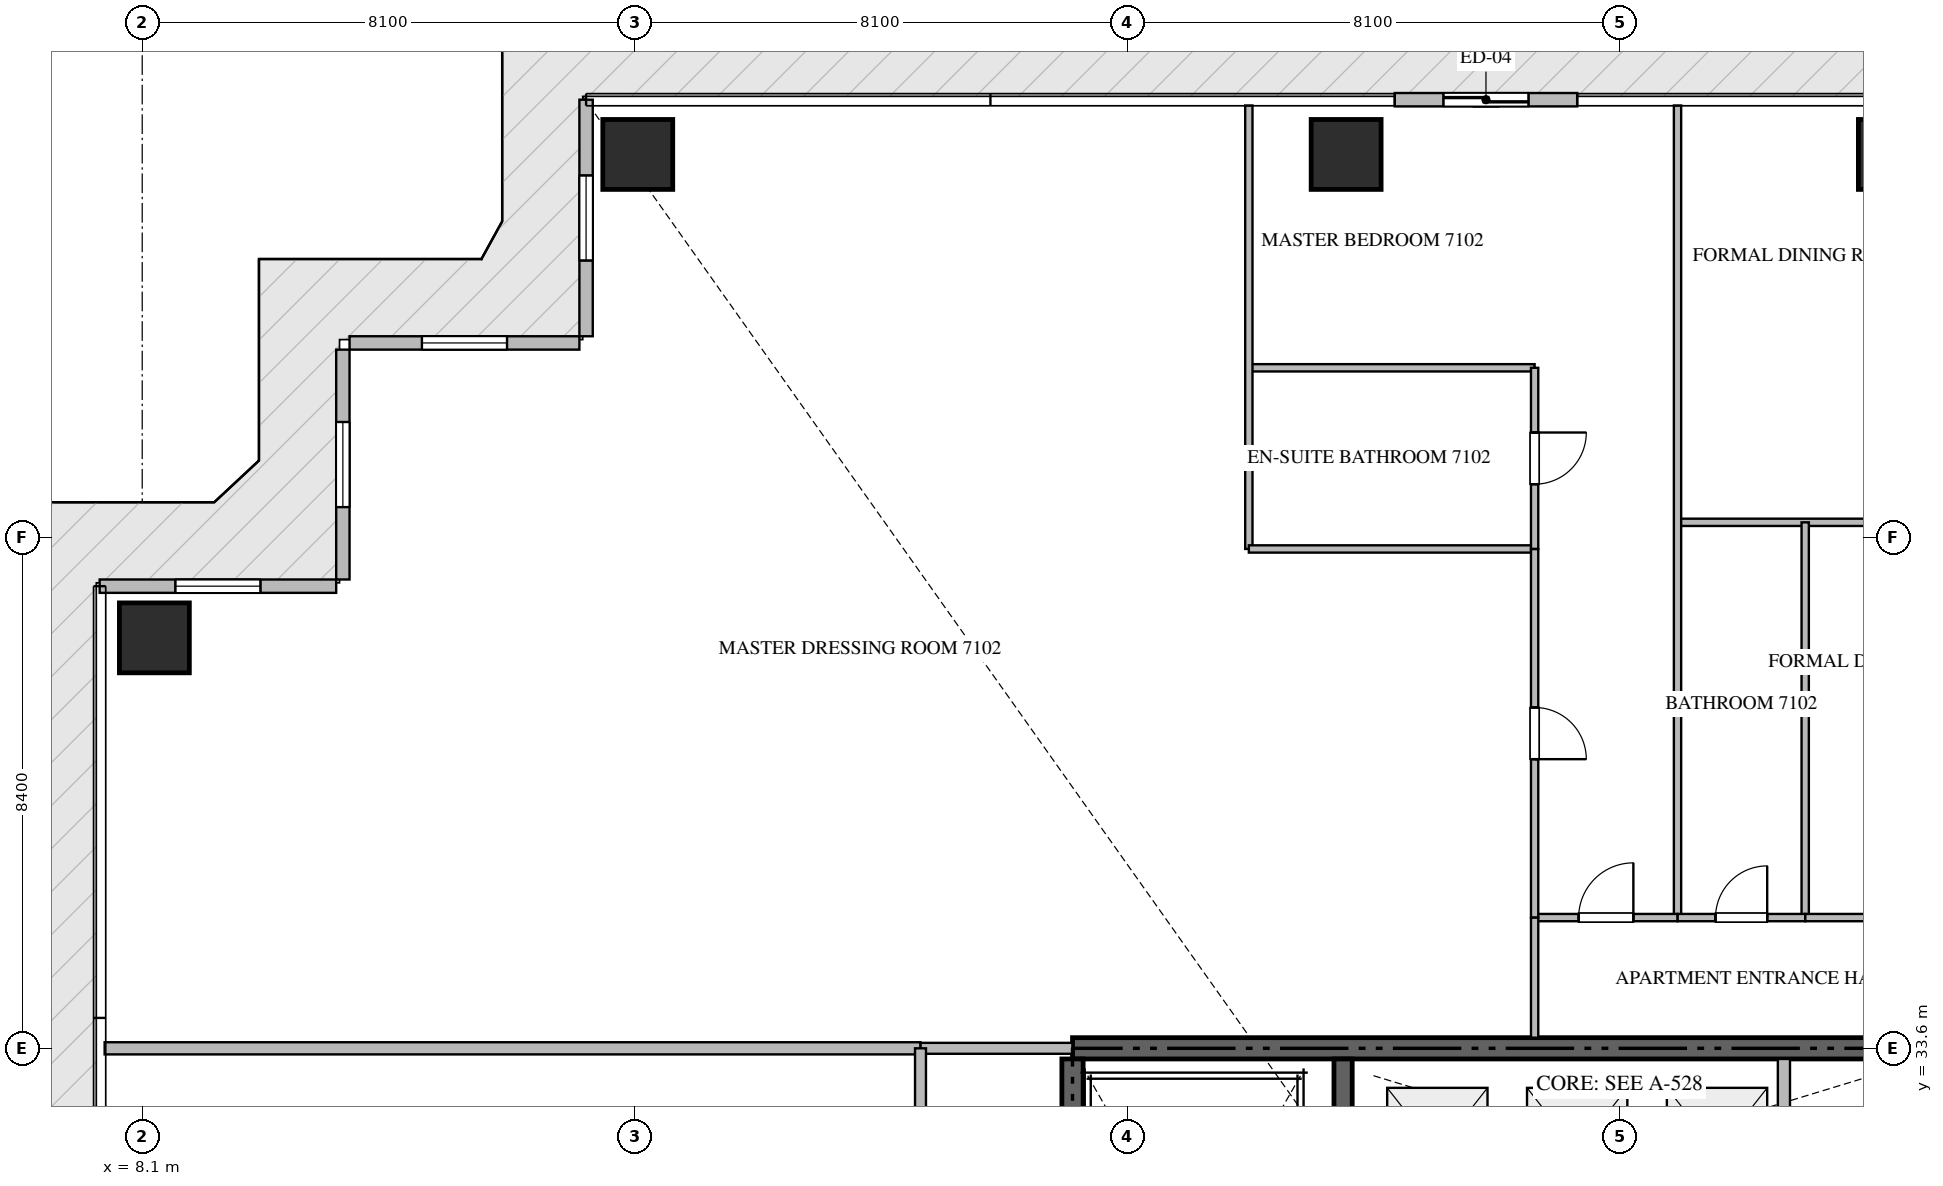
"""IFC4 building model, lengths in metres.
Left out: names, types, materials, properties, quantities, classifications, styles, units other than length and angle.
Written with IfcOpenShell. Run it as: python <this file> out.ifc"""

import sys

from ifc_helpers import new_model, si_unit, direction, frame, frame_2d, origin, origin_2d, place, context, subcontext, project, spatial, rectangle, extrude, source, transform, mapped, element, fill, save


model = new_model("IFC4")
c1 = context("Model", 3, precision=1e-05, world=origin(), true_north=direction((0.0, 1.0)))
c2 = subcontext(c1, "Body", "Model", "MODEL_VIEW")
j1 = project(units=[si_unit("LENGTHUNIT", "METRE"), si_unit("PLANEANGLEUNIT", "RADIAN")], contexts=[c1])
p1 = place(None, origin())
s1 = spatial("IfcSite", under=j1, at=p1, CompositionType="ELEMENT")
p2 = place(p1, origin())
s2 = spatial("IfcBuilding", under=s1, at=p2, CompositionType="ELEMENT")
p3 = place(p2, frame((0.0, 0.0, 283.6)))
s3 = spatial("IfcBuildingStorey", under=s2, at=p3, CompositionType="ELEMENT", Elevation=283.6)
p4 = place(p3, frame((41.4, 33.6, -0.26), z_axis=(0.0, 0.0, 1.0), x_axis=(-1.0, 0.0, 0.0)))
e1 = element("IfcWall", 1, at=p4, inside=s3, PredefinedType="SHEAR", context=c2, shape_type="SweptSolid", body=[
    extrude(rectangle(XDim=18.0, YDim=0.35, at=frame_2d((9.0, 0.0))), origin(), (0.0, 0.0, 1.0), 3.668),
])
p5 = place(p3, frame((23.4, 24.25, -0.26), z_axis=(0.0, 0.0, 1.0), x_axis=(0.0, 1.0, 0.0)))
e2 = element("IfcWall", 2, at=p5, inside=s3, PredefinedType="SHEAR", context=c2, shape_type="SweptSolid", body=[
    extrude(rectangle(XDim=9.175, YDim=0.35, at=frame_2d((4.587, 0.0))), origin(), (0.0, 0.0, 1.0), 3.668),
])
p6 = place(p3, frame((27.85, 23.55, -0.26), z_axis=(0.0, 0.0, 1.0), x_axis=(0.0, 1.0, 0.0)))
e3 = element("IfcWall", 3, at=p6, inside=s3, PredefinedType="SHEAR", context=c2, shape_type="SweptSolid", body=[
    extrude(rectangle(XDim=9.875, YDim=0.3, at=frame_2d((4.938, 0.0))), origin(), (0.0, 0.0, 1.0), 3.668),
])
m1 = source(origin(), c2, "Body", "SweptSolid", [
    extrude(rectangle(XDim=1.15, YDim=1.15, at=origin_2d()), origin(), (0.0, 0.0, 1.0), 3.67),
])
for number, where, z_axis, x_axis in (
    (4, (16.25, 48.3, -0.26), (0.0, 0.0, 1.0), (1.0, 0.0, 0.0)),
    (5, (27.9, 48.3, -0.26), (0.0, 0.0, 1.0), (1.0, 0.0, 0.0)),
    (6, (36.9, 48.3, -0.26), (0.0, 0.0, 1.0), (1.0, 0.0, 0.0)),
    (7, (8.3, 40.35, -0.26), (0.0, 0.0, 1.0), (1.0, 0.0, 0.0)),
):
    element("IfcColumn", number, at=place(p3, frame(where, z_axis=z_axis, x_axis=x_axis)), inside=s3, PredefinedType="COLUMN", context=c2, shape_type="MappedRepresentation", body=[
        mapped(m1, transform((0.0, 0.0, 0.0), scale=1.0)),
    ])
p7 = place(p3, frame((31.7, 49.2, 0.0), z_axis=(0.0, 0.0, 1.0), x_axis=(-1.0, 0.0, 0.0)))
e8 = element("IfcWall", 8, at=p7, inside=s3, PredefinedType="ELEMENTEDWALL", context=c2, shape_type="SweptSolid", body=[
    extrude(rectangle(XDim=3.0, YDim=0.22, at=frame_2d((1.5, 0.0))), origin(), (0.0, 0.0, 1.0), 3.395),
])
p8 = place(p7, frame((0.8, 0.0, 0.0)))
e9 = element("IfcOpeningElement", 9, at=p8, cuts=e8, PredefinedType="OPENING", context=c2, shape_type="SweptSolid", body=[
    extrude(rectangle(XDim=1.4, YDim=2.25, at=frame_2d((0.7, 1.125))), frame((0.0, 0.12, 0.0), z_axis=(0.0, -1.0, 0.0), x_axis=(1.0, 0.0, 0.0)), (0.0, 0.0, 1.0), 0.24),
])
p9 = place(p3, frame((15.4, 49.2, 0.0), z_axis=(0.0, 0.0, 1.0), x_axis=(0.0, -1.0, 0.0)))
e10 = element("IfcWall", 10, at=p9, inside=s3, PredefinedType="ELEMENTEDWALL", context=c2, shape_type="SweptSolid", body=[
    extrude(rectangle(XDim=3.89, YDim=0.22, at=frame_2d((1.945, 0.0))), origin(), (0.0, 0.0, 1.0), 3.395),
])
p10 = place(p9, frame((1.245, 0.0, 0.65)))
e11 = element("IfcOpeningElement", 11, at=p10, cuts=e10, PredefinedType="OPENING", context=c2, shape_type="SweptSolid", body=[
    extrude(rectangle(XDim=1.4, YDim=1.35, at=frame_2d((0.7, 0.675))), frame((0.0, 0.12, 0.0), z_axis=(0.0, -1.0, 0.0), x_axis=(1.0, 0.0, 0.0)), (0.0, 0.0, 1.0), 0.24),
])
p11 = place(p3, frame((15.29, 45.2, 0.0), z_axis=(0.0, 0.0, 1.0), x_axis=(-1.0, 0.0, 0.0)))
e12 = element("IfcWall", 12, at=p11, inside=s3, PredefinedType="ELEMENTEDWALL", context=c2, shape_type="SweptSolid", body=[
    extrude(rectangle(XDim=3.78, YDim=0.22, at=frame_2d((1.89, 0.0))), origin(), (0.0, 0.0, 1.0), 3.395),
])
p12 = place(p11, frame((1.19, 0.0, 0.65)))
e13 = element("IfcOpeningElement", 13, at=p12, cuts=e12, PredefinedType="OPENING", context=c2, shape_type="SweptSolid", body=[
    extrude(rectangle(XDim=1.4, YDim=1.35, at=frame_2d((0.7, 0.675))), frame((0.0, 0.12, 0.0), z_axis=(0.0, -1.0, 0.0), x_axis=(1.0, 0.0, 0.0)), (0.0, 0.0, 1.0), 0.24),
])
p13 = place(p3, frame((11.4, 45.09, 0.0), z_axis=(0.0, 0.0, 1.0), x_axis=(0.0, -1.0, 0.0)))
e14 = element("IfcWall", 14, at=p13, inside=s3, PredefinedType="ELEMENTEDWALL", context=c2, shape_type="SweptSolid", body=[
    extrude(rectangle(XDim=3.78, YDim=0.22, at=frame_2d((1.89, 0.0))), origin(), (0.0, 0.0, 1.0), 3.395),
])
p14 = place(p13, frame((1.19, 0.0, 0.65)))
e15 = element("IfcOpeningElement", 15, at=p14, cuts=e14, PredefinedType="OPENING", context=c2, shape_type="SweptSolid", body=[
    extrude(rectangle(XDim=1.4, YDim=1.35, at=frame_2d((0.7, 0.675))), frame((0.0, 0.12, 0.0), z_axis=(0.0, -1.0, 0.0), x_axis=(1.0, 0.0, 0.0)), (0.0, 0.0, 1.0), 0.24),
])
p15 = place(p3, frame((11.29, 41.2, 0.0), z_axis=(0.0, 0.0, 1.0), x_axis=(-1.0, 0.0, 0.0)))
e16 = element("IfcWall", 16, at=p15, inside=s3, PredefinedType="ELEMENTEDWALL", context=c2, shape_type="SweptSolid", body=[
    extrude(rectangle(XDim=3.89, YDim=0.22, at=frame_2d((1.945, 0.0))), origin(), (0.0, 0.0, 1.0), 3.395),
])
p16 = place(p15, frame((1.245, 0.0, 0.65)))
e17 = element("IfcOpeningElement", 17, at=p16, cuts=e16, PredefinedType="OPENING", context=c2, shape_type="SweptSolid", body=[
    extrude(rectangle(XDim=1.4, YDim=1.35, at=frame_2d((0.7, 0.675))), frame((0.0, 0.12, 0.0), z_axis=(0.0, -1.0, 0.0), x_axis=(1.0, 0.0, 0.0)), (0.0, 0.0, 1.0), 0.24),
])
p17 = place(p3, frame((35.1, 30.75, 0.0), z_axis=(0.0, 0.0, 1.0), x_axis=(0.0, 1.0, 0.0)))
e18 = element("IfcWall", 18, at=p17, inside=s3, PredefinedType="STANDARD", context=c2, shape_type="SweptSolid", body=[
    extrude(rectangle(XDim=2.675, YDim=0.2, at=frame_2d((1.337, 0.0))), origin(), (0.0, 0.0, 1.0), 3.41),
])
p18 = place(p3, frame((7.482, 33.6, 0.0), z_axis=(0.0, 0.0, 1.0), x_axis=(1.0, 0.0, 0.0)))
e19 = element("IfcWall", 19, at=p18, inside=s3, PredefinedType="PARTITIONING", context=c2, shape_type="SweptSolid", body=[
    extrude(rectangle(XDim=13.418, YDim=0.2, at=frame_2d((6.709, 0.0))), origin(), (0.0, 0.0, 1.0), 3.41),
])
p19 = place(p3, frame((20.902, 33.6, 0.0), z_axis=(0.0, 0.0, 1.0), x_axis=(1.0, 0.0, 0.0)))
e20 = element("IfcWall", 20, at=p19, inside=s3, PredefinedType="PARTITIONING", context=c2, shape_type="SweptSolid", body=[
    extrude(rectangle(XDim=2.496, YDim=0.18, at=frame_2d((1.248, 0.0))), origin(), (0.0, 0.0, 1.0), 3.41),
])
p20 = place(p3, frame((20.9, 16.8, 0.0), z_axis=(0.0, 0.0, 1.0), x_axis=(0.0, 1.0, 0.0)))
e21 = element("IfcWall", 21, at=p20, inside=s3, PredefinedType="PARTITIONING", context=c2, shape_type="SweptSolid", body=[
    extrude(rectangle(XDim=16.8, YDim=0.18, at=frame_2d((8.4, 0.0))), origin(), (0.0, 0.0, 1.0), 3.41),
])
p21 = place(p20, frame((4.693, 0.0, 0.0)))
e22 = element("IfcOpeningElement", 22, at=p21, cuts=e21, PredefinedType="OPENING", context=c2, shape_type="SweptSolid", body=[
    extrude(rectangle(XDim=1.0, YDim=2.15, at=frame_2d((0.5, 1.075))), frame((0.0, 0.1, 0.0), z_axis=(0.0, -1.0, 0.0), x_axis=(1.0, 0.0, 0.0)), (0.0, 0.0, 1.0), 0.2),
])
p22 = place(p20, frame((13.13, 0.0, 0.0)))
e23 = element("IfcOpeningElement", 23, at=p22, cuts=e21, PredefinedType="OPENING", context=c2, shape_type="SweptSolid", body=[
    extrude(rectangle(XDim=1.0, YDim=2.15, at=frame_2d((0.5, 1.075))), frame((0.0, 0.1, 0.0), z_axis=(0.0, -1.0, 0.0), x_axis=(1.0, 0.0, 0.0)), (0.0, 0.0, 1.0), 0.2),
])
p23 = place(p3, frame((33.35, 42.25, 0.0), z_axis=(0.0, 0.0, 1.0), x_axis=(1.0, 0.0, 0.0)))
e24 = element("IfcWall", 24, at=p23, inside=s3, PredefinedType="PARTITIONING", context=c2, shape_type="SweptSolid", body=[
    extrude(rectangle(XDim=5.15, YDim=0.12, at=frame_2d((2.575, 0.0))), origin(), (0.0, 0.0, 1.0), 3.41),
])
p24 = place(p3, frame((33.35, 49.105, 0.0), z_axis=(0.0, 0.0, 1.0), x_axis=(0.0, -1.0, 0.0)))
e25 = element("IfcWall", 25, at=p24, inside=s3, PredefinedType="PARTITIONING", context=c2, shape_type="SweptSolid", body=[
    extrude(rectangle(XDim=13.355, YDim=0.12, at=frame_2d((6.677, 0.0))), origin(), (0.0, 0.0, 1.0), 3.41),
])
p25 = place(p3, frame((35.45, 42.25, 0.0), z_axis=(0.0, 0.0, 1.0), x_axis=(0.0, -1.0, 0.0)))
e26 = element("IfcWall", 26, at=p25, inside=s3, PredefinedType="PARTITIONING", context=c2, shape_type="SweptSolid", body=[
    extrude(rectangle(XDim=6.5, YDim=0.12, at=frame_2d((3.25, 0.0))), origin(), (0.0, 0.0, 1.0), 3.41),
])
p26 = place(p3, frame((33.35, 35.75, 0.0), z_axis=(0.0, 0.0, 1.0), x_axis=(1.0, 0.0, 0.0)))
e27 = element("IfcWall", 27, at=p26, inside=s3, PredefinedType="PARTITIONING", context=c2, shape_type="SweptSolid", body=[
    extrude(rectangle(XDim=2.1, YDim=0.12, at=frame_2d((1.05, 0.0))), origin(), (0.0, 0.0, 1.0), 3.41),
])
p27 = place(p26, frame((0.625, 0.0, 0.0)))
e28 = element("IfcOpeningElement", 28, at=p27, cuts=e27, PredefinedType="OPENING", context=c2, shape_type="SweptSolid", body=[
    extrude(rectangle(XDim=0.85, YDim=2.1, at=frame_2d((0.425, 1.05))), frame((0.0, 0.07, 0.0), z_axis=(0.0, -1.0, 0.0), x_axis=(1.0, 0.0, 0.0)), (0.0, 0.0, 1.0), 0.14),
])
p28 = place(p3, frame((35.452, 35.75, 0.0), z_axis=(0.0, 0.0, 1.0), x_axis=(1.0, 0.0, 0.0)))
e29 = element("IfcWall", 29, at=p28, inside=s3, PredefinedType="PARTITIONING", context=c2, shape_type="SweptSolid", body=[
    extrude(rectangle(XDim=3.048, YDim=0.12, at=frame_2d((1.524, 0.0))), origin(), (0.0, 0.0, 1.0), 3.41),
])
p29 = place(p28, frame((1.099, 0.0, 0.0)))
e30 = element("IfcOpeningElement", 30, at=p29, cuts=e29, PredefinedType="OPENING", context=c2, shape_type="SweptSolid", body=[
    extrude(rectangle(XDim=0.85, YDim=2.1, at=frame_2d((0.425, 1.05))), frame((0.0, 0.07, 0.0), z_axis=(0.0, -1.0, 0.0), x_axis=(1.0, 0.0, 0.0)), (0.0, 0.0, 1.0), 0.14),
])
p30 = place(p3, frame((31.0, 35.75, 0.0), z_axis=(0.0, 0.0, 1.0), x_axis=(1.0, 0.0, 0.0)))
e31 = element("IfcWall", 31, at=p30, inside=s3, PredefinedType="PARTITIONING", context=c2, shape_type="SweptSolid", body=[
    extrude(rectangle(XDim=2.348, YDim=0.12, at=frame_2d((1.174, 0.0))), origin(), (0.0, 0.0, 1.0), 3.41),
])
p31 = place(p30, frame((0.724, 0.0, 0.0)))
e32 = element("IfcOpeningElement", 32, at=p31, cuts=e31, PredefinedType="OPENING", context=c2, shape_type="SweptSolid", body=[
    extrude(rectangle(XDim=0.9, YDim=2.1, at=frame_2d((0.45, 1.05))), frame((0.0, 0.07, 0.0), z_axis=(0.0, -1.0, 0.0), x_axis=(1.0, 0.0, 0.0)), (0.0, 0.0, 1.0), 0.14),
])
p32 = place(p3, frame((26.3, 44.791, 0.0), z_axis=(0.0, 0.0, 1.0), x_axis=(1.0, 0.0, 0.0)))
e33 = element("IfcWall", 33, at=p32, inside=s3, PredefinedType="PARTITIONING", context=c2, shape_type="SweptSolid", body=[
    extrude(rectangle(XDim=4.7, YDim=0.12, at=frame_2d((2.35, 0.0))), origin(), (0.0, 0.0, 1.0), 3.41),
])
p33 = place(p3, frame((26.3, 49.105, 0.0), z_axis=(0.0, 0.0, 1.0), x_axis=(0.0, -1.0, 0.0)))
e34 = element("IfcWall", 34, at=p33, inside=s3, PredefinedType="PARTITIONING", context=c2, shape_type="SweptSolid", body=[
    extrude(rectangle(XDim=7.293, YDim=0.12, at=frame_2d((3.646, 0.0))), origin(), (0.0, 0.0, 1.0), 3.41),
])
p34 = place(p3, frame((26.3, 41.812, 0.0), z_axis=(0.0, 0.0, 1.0), x_axis=(1.0, 0.0, 0.0)))
e35 = element("IfcWall", 35, at=p34, inside=s3, PredefinedType="PARTITIONING", context=c2, shape_type="SweptSolid", body=[
    extrude(rectangle(XDim=4.7, YDim=0.12, at=frame_2d((2.35, 0.0))), origin(), (0.0, 0.0, 1.0), 3.41),
])
p35 = place(p3, frame((31.0, 44.791, 0.0), z_axis=(0.0, 0.0, 1.0), x_axis=(0.0, -1.0, 0.0)))
e36 = element("IfcWall", 36, at=p35, inside=s3, PredefinedType="PARTITIONING", context=c2, shape_type="SweptSolid", body=[
    extrude(rectangle(XDim=2.979, YDim=0.12, at=frame_2d((1.49, 0.0))), origin(), (0.0, 0.0, 1.0), 3.41),
])
p36 = place(p35, frame((1.064, 0.0, 0.0)))
e37 = element("IfcOpeningElement", 37, at=p36, cuts=e36, PredefinedType="OPENING", context=c2, shape_type="SweptSolid", body=[
    extrude(rectangle(XDim=0.85, YDim=2.1, at=frame_2d((0.425, 1.05))), frame((0.0, 0.07, 0.0), z_axis=(0.0, -1.0, 0.0), x_axis=(1.0, 0.0, 0.0)), (0.0, 0.0, 1.0), 0.14),
])
p37 = place(p3, frame((31.0, 41.81, 0.0), z_axis=(0.0, 0.0, 1.0), x_axis=(0.0, -1.0, 0.0)))
e38 = element("IfcWall", 38, at=p37, inside=s3, PredefinedType="PARTITIONING", context=c2, shape_type="SweptSolid", body=[
    extrude(rectangle(XDim=6.06, YDim=0.12, at=frame_2d((3.03, 0.0))), origin(), (0.0, 0.0, 1.0), 3.41),
])
p38 = place(p37, frame((2.605, 0.0, 0.0)))
e39 = element("IfcOpeningElement", 39, at=p38, cuts=e38, PredefinedType="OPENING", context=c2, shape_type="SweptSolid", body=[
    extrude(rectangle(XDim=0.85, YDim=2.1, at=frame_2d((0.425, 1.05))), frame((0.0, 0.07, 0.0), z_axis=(0.0, -1.0, 0.0), x_axis=(1.0, 0.0, 0.0)), (0.0, 0.0, 1.0), 0.14),
])
p39 = place(p3, frame((31.0, 35.748, 0.0), z_axis=(0.0, 0.0, 1.0), x_axis=(0.0, -1.0, 0.0)))
e40 = element("IfcWall", 40, at=p39, inside=s3, PredefinedType="PARTITIONING", context=c2, shape_type="SweptSolid", body=[
    extrude(rectangle(XDim=1.973, YDim=0.12, at=frame_2d((0.987, 0.0))), origin(), (0.0, 0.0, 1.0), 3.41),
])
m2 = source(origin(), c2, "Body", "SweptSolid", [
    extrude(rectangle(XDim=1.4, YDim=2.25, at=frame_2d((0.7, 1.125))), frame((0.0, 0.025, 0.0), z_axis=(0.0, -1.0, 0.0), x_axis=(1.0, 0.0, 0.0)), (0.0, 0.0, 1.0), 0.05),
])
p40 = place(p8, origin())
e41 = element("IfcDoor", 41, at=p40, inside=s3, OperationType="SLIDING_TO_LEFT", PredefinedType="DOOR", context=c2, shape_type="MappedRepresentation", body=[
    mapped(m2, transform((0.0, 0.0, 0.0), scale=1.0)),
])
fill(e9, e41)
m3 = source(origin(), c2, "Body", "SweptSolid", [
    extrude(rectangle(XDim=1.4, YDim=1.35, at=frame_2d((0.7, 0.675))), frame((0.0, 0.03, 0.0), z_axis=(0.0, -1.0, 0.0), x_axis=(1.0, 0.0, 0.0)), (0.0, 0.0, 1.0), 0.06),
])
p41 = place(p10, origin())
e42 = element("IfcWindow", 42, at=p41, inside=s3, PartitioningType="SINGLE_PANEL", PredefinedType="WINDOW", context=c2, shape_type="MappedRepresentation", body=[
    mapped(m3, transform((0.0, 0.0, 0.0), scale=1.0)),
])
fill(e11, e42)
p42 = place(p12, origin())
e43 = element("IfcWindow", 43, at=p42, inside=s3, PartitioningType="SINGLE_PANEL", PredefinedType="WINDOW", context=c2, shape_type="MappedRepresentation", body=[
    mapped(m3, transform((0.0, 0.0, 0.0), scale=1.0)),
])
fill(e13, e43)
p43 = place(p14, origin())
e44 = element("IfcWindow", 44, at=p43, inside=s3, PartitioningType="SINGLE_PANEL", PredefinedType="WINDOW", context=c2, shape_type="MappedRepresentation", body=[
    mapped(m3, transform((0.0, 0.0, 0.0), scale=1.0)),
])
fill(e15, e44)
p44 = place(p16, origin())
e45 = element("IfcWindow", 45, at=p44, inside=s3, PartitioningType="SINGLE_PANEL", PredefinedType="WINDOW", context=c2, shape_type="MappedRepresentation", body=[
    mapped(m3, transform((0.0, 0.0, 0.0), scale=1.0)),
])
fill(e17, e45)
m4 = source(origin(), c2, "Body", "SweptSolid", [
    extrude(rectangle(XDim=0.85, YDim=2.1, at=frame_2d((0.425, 1.05))), frame((0.0, 0.025, 0.0), z_axis=(0.0, -1.0, 0.0), x_axis=(1.0, 0.0, 0.0)), (0.0, 0.0, 1.0), 0.05),
])
p45 = place(p27, origin())
e46 = element("IfcDoor", 46, at=p45, inside=s3, OperationType="SINGLE_SWING_RIGHT", PredefinedType="DOOR", context=c2, shape_type="MappedRepresentation", body=[
    mapped(m4, transform((0.0, 0.0, 0.0), scale=1.0)),
])
fill(e28, e46)
m5 = source(origin(), c2, "Body", "SweptSolid", [
    extrude(rectangle(XDim=0.9, YDim=2.1, at=frame_2d((0.45, 1.05))), frame((0.0, 0.025, 0.0), z_axis=(0.0, -1.0, 0.0), x_axis=(1.0, 0.0, 0.0)), (0.0, 0.0, 1.0), 0.05),
])
p46 = place(p31, origin())
e47 = element("IfcDoor", 47, at=p46, inside=s3, OperationType="SINGLE_SWING_RIGHT", PredefinedType="DOOR", context=c2, shape_type="MappedRepresentation", body=[
    mapped(m5, transform((0.0, 0.0, 0.0), scale=1.0)),
])
fill(e32, e47)
p47 = place(p36, origin())
e48 = element("IfcDoor", 48, at=p47, inside=s3, OperationType="SINGLE_SWING_LEFT", PredefinedType="DOOR", context=c2, shape_type="MappedRepresentation", body=[
    mapped(m4, transform((0.0, 0.0, 0.0), scale=1.0)),
])
fill(e37, e48)
p48 = place(p38, origin())
e49 = element("IfcDoor", 49, at=p48, inside=s3, OperationType="SINGLE_SWING_RIGHT", PredefinedType="DOOR", context=c2, shape_type="MappedRepresentation", body=[
    mapped(m4, transform((0.0, 0.0, 0.0), scale=1.0)),
])
fill(e39, e49)
save(model, sys.argv[1])
